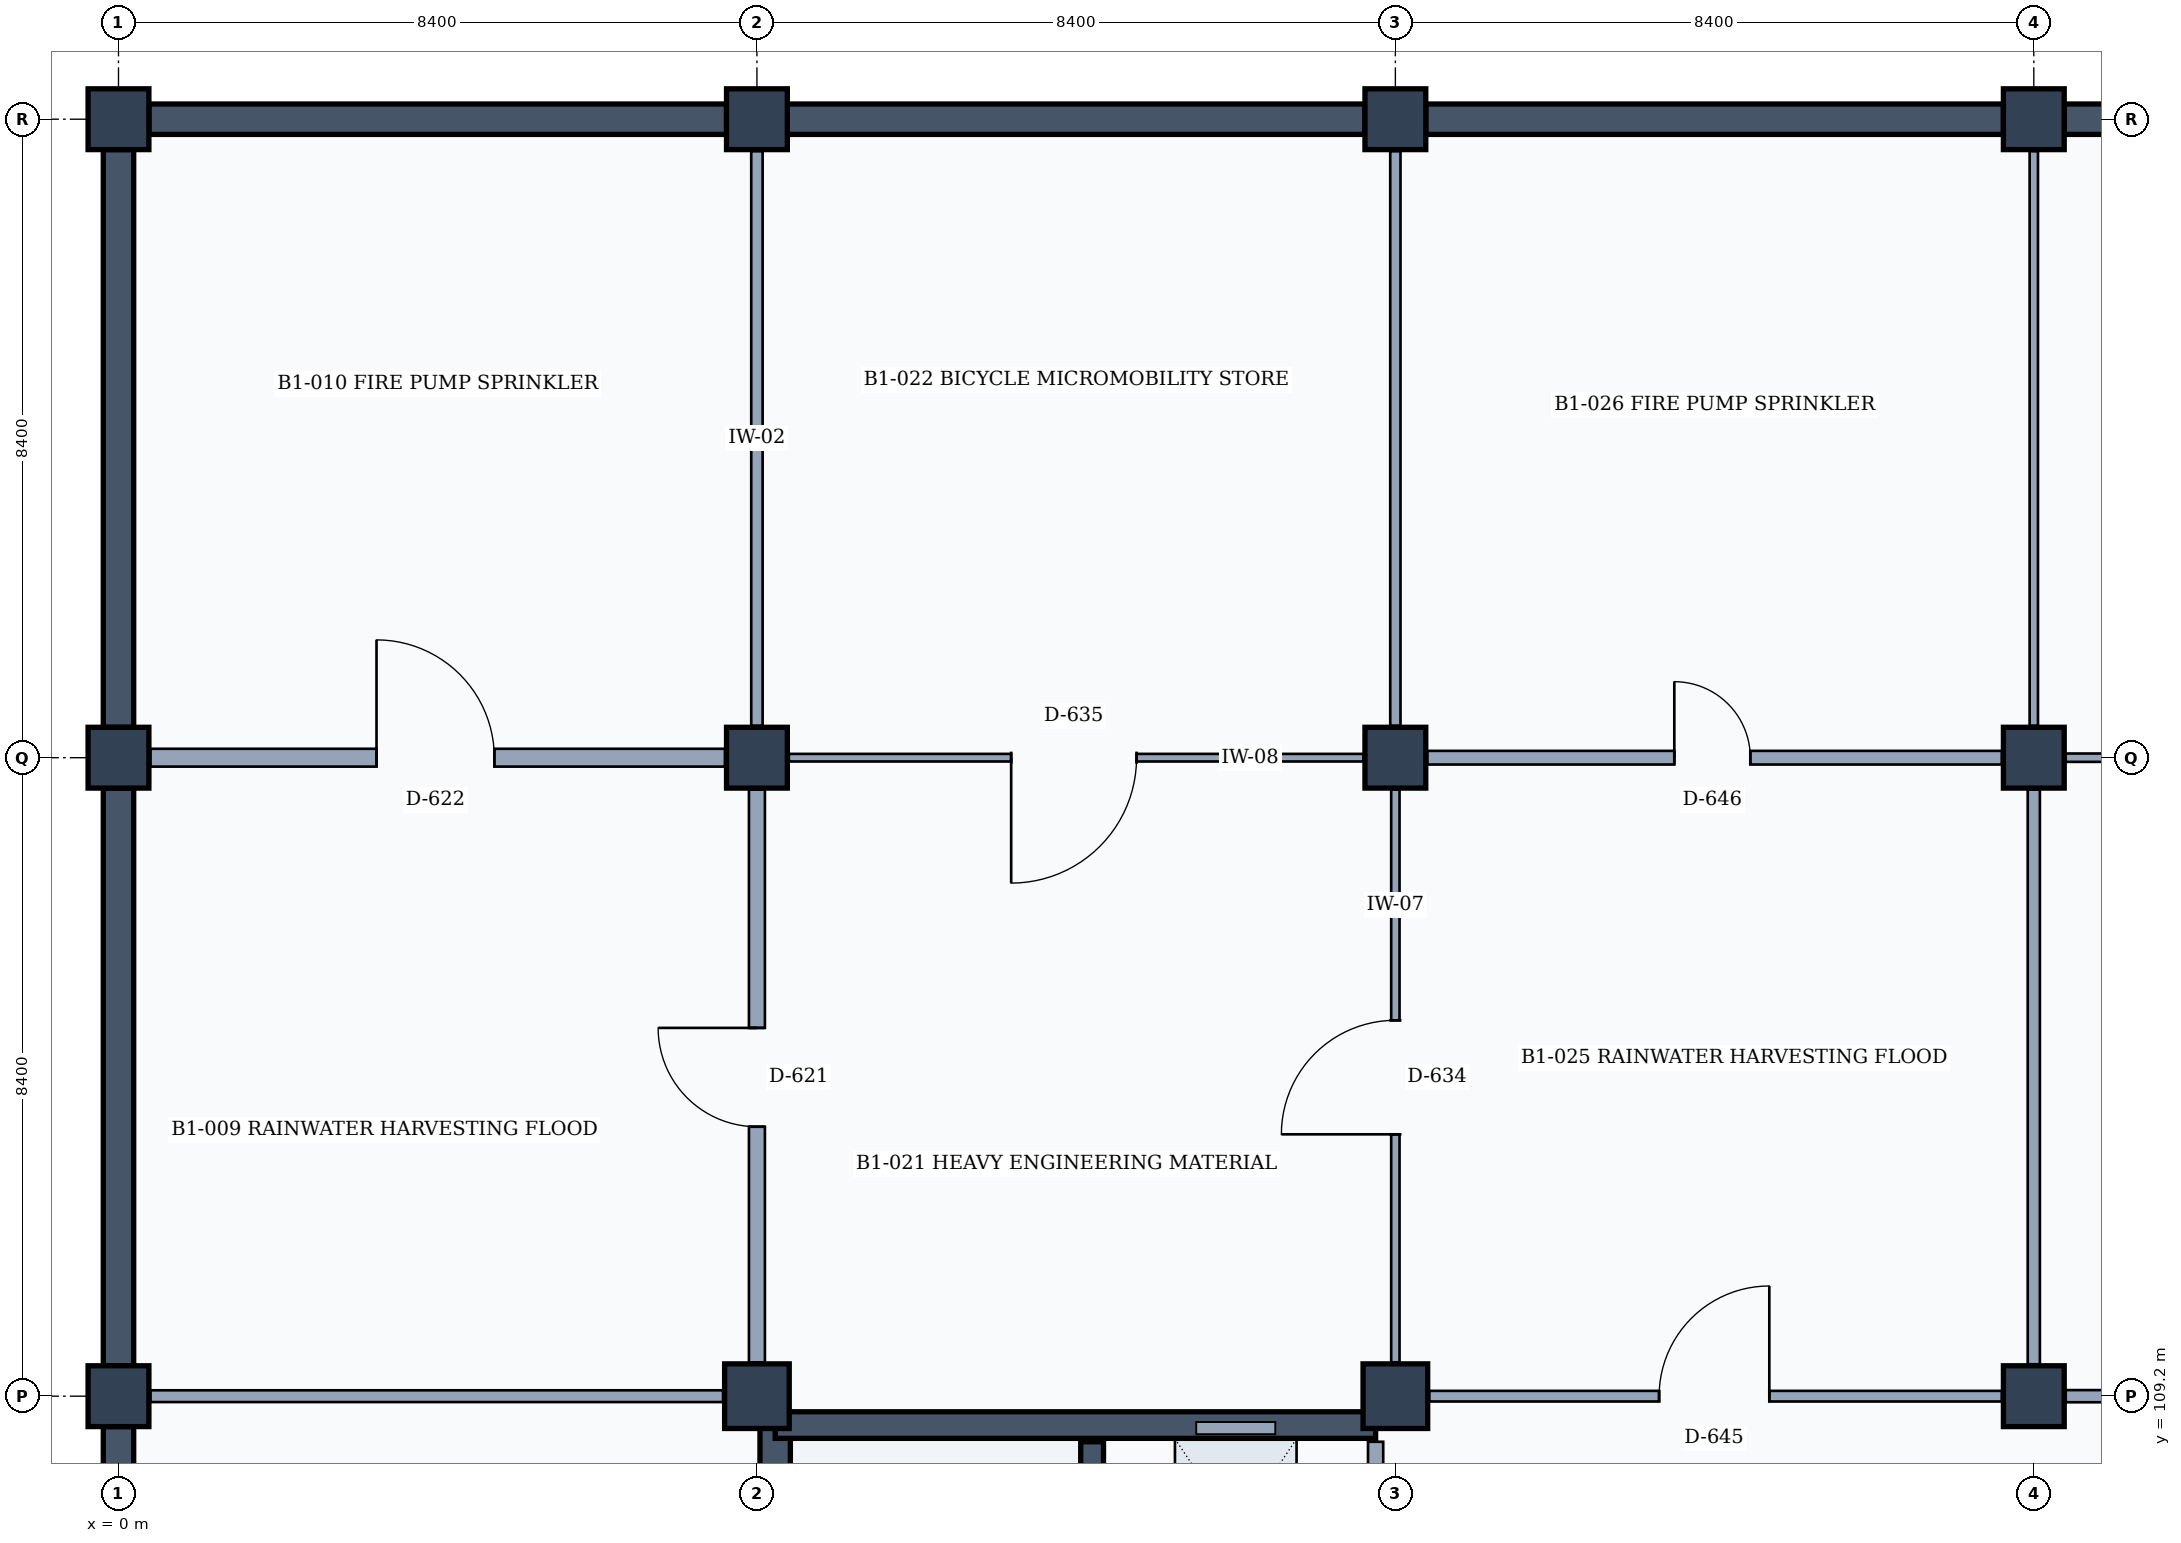
"""IFC4 building model, lengths in metres.
Left out: names, types, materials, properties, quantities, classifications, styles, units other than length and angle.
Written with IfcOpenShell. Run it as: python <this file> out.ifc"""

import sys

from ifc_helpers import new_model, si_unit, direction, frame, frame_2d, origin, origin_2d, place, context, subcontext, project, spatial, rectangle, extrude, element, fill, save


model = new_model("IFC4")
c1 = context("Model", 3, precision=1e-05, world=origin(), true_north=direction((0.0, 1.0)))
c2 = subcontext(c1, "Body", "Model", "MODEL_VIEW")
j1 = project(units=[si_unit("LENGTHUNIT", "METRE"), si_unit("PLANEANGLEUNIT", "RADIAN")], contexts=[c1])
p1 = place(None, origin())
s1 = spatial("IfcSite", under=j1, at=p1, CompositionType="ELEMENT")
p2 = place(p1, origin())
s2 = spatial("IfcBuilding", under=s1, at=p2, CompositionType="ELEMENT")
p3 = place(p2, frame((0.0, 0.0, -4.2)))
s3 = spatial("IfcBuildingStorey", under=s2, at=p3, CompositionType="ELEMENT", Elevation=-4.2)
for number, where, z_axis, x_axis in (
    (1, (0.0, 109.2, 0.0), (0.0, 0.0, 1.0), (1.0, 0.0, 0.0)),
    (2, (0.0, 117.6, 0.0), (0.0, 0.0, 1.0), (1.0, 0.0, 0.0)),
    (3, (0.0, 126.0, 0.0), (0.0, 0.0, 1.0), (1.0, 0.0, 0.0)),
):
    element("IfcColumn", number, at=place(p3, frame(where, z_axis=z_axis, x_axis=x_axis)), inside=s3, PredefinedType="COLUMN", context=c2, shape_type="SweptSolid", body=[
        extrude(rectangle(XDim=0.8, YDim=0.8, at=origin_2d()), origin(), (0.0, 0.0, 1.0), 4.2),
    ])
p4 = place(p3, frame((8.4, 109.2, 0.0), z_axis=(0.0, 0.0, 1.0), x_axis=(1.0, 0.0, 0.0)))
e4 = element("IfcColumn", 4, at=p4, inside=s3, PredefinedType="COLUMN", context=c2, shape_type="SweptSolid", body=[
    extrude(rectangle(XDim=0.85, YDim=0.85, at=origin_2d()), origin(), (0.0, 0.0, 1.0), 4.2),
])
for number, where, z_axis, x_axis in (
    (5, (8.4, 117.6, 0.0), (0.0, 0.0, 1.0), (1.0, 0.0, 0.0)),
    (6, (8.4, 126.0, 0.0), (0.0, 0.0, 1.0), (1.0, 0.0, 0.0)),
):
    element("IfcColumn", number, at=place(p3, frame(where, z_axis=z_axis, x_axis=x_axis)), inside=s3, PredefinedType="COLUMN", context=c2, shape_type="SweptSolid", body=[
        extrude(rectangle(XDim=0.8, YDim=0.8, at=origin_2d()), origin(), (0.0, 0.0, 1.0), 4.2),
    ])
p5 = place(p3, frame((16.8, 109.2, 0.0), z_axis=(0.0, 0.0, 1.0), x_axis=(1.0, 0.0, 0.0)))
e7 = element("IfcColumn", 7, at=p5, inside=s3, PredefinedType="COLUMN", context=c2, shape_type="SweptSolid", body=[
    extrude(rectangle(XDim=0.85, YDim=0.85, at=origin_2d()), origin(), (0.0, 0.0, 1.0), 4.2),
])
for number, where, z_axis, x_axis in (
    (8, (16.8, 117.6, 0.0), (0.0, 0.0, 1.0), (1.0, 0.0, 0.0)),
    (9, (16.8, 126.0, 0.0), (0.0, 0.0, 1.0), (1.0, 0.0, 0.0)),
    (10, (25.2, 109.2, 0.0), (0.0, 0.0, 1.0), (1.0, 0.0, 0.0)),
    (11, (25.2, 117.6, 0.0), (0.0, 0.0, 1.0), (1.0, 0.0, 0.0)),
    (12, (25.2, 126.0, 0.0), (0.0, 0.0, 1.0), (1.0, 0.0, 0.0)),
):
    element("IfcColumn", number, at=place(p3, frame(where, z_axis=z_axis, x_axis=x_axis)), inside=s3, PredefinedType="COLUMN", context=c2, shape_type="SweptSolid", body=[
        extrude(rectangle(XDim=0.8, YDim=0.8, at=origin_2d()), origin(), (0.0, 0.0, 1.0), 4.2),
    ])
p6 = place(p3, frame((0.0, 101.2, 0.0), z_axis=(0.0, 0.0, 1.0), x_axis=(0.0, 1.0, 0.0)))
e13 = element("IfcWall", 13, at=p6, inside=s3, PredefinedType="STANDARD", context=c2, shape_type="SweptSolid", body=[
    extrude(rectangle(XDim=7.6, YDim=0.4, at=frame_2d((3.8, 0.0))), origin(), (0.0, 0.0, 1.0), 3.88),
])
p7 = place(p3, frame((0.0, 109.6, 0.0), z_axis=(0.0, 0.0, 1.0), x_axis=(0.0, 1.0, 0.0)))
e14 = element("IfcWall", 14, at=p7, inside=s3, PredefinedType="STANDARD", context=c2, shape_type="SweptSolid", body=[
    extrude(rectangle(XDim=7.6, YDim=0.4, at=frame_2d((3.8, 0.0))), origin(), (0.0, 0.0, 1.0), 3.88),
])
for number, where, z_axis, x_axis in (
    (15, (0.4, 126.0, 0.0), (0.0, 0.0, 1.0), (1.0, 0.0, 0.0)),
    (16, (0.0, 118.0, 0.0), (0.0, 0.0, 1.0), (0.0, 1.0, 0.0)),
):
    element("IfcWall", number, at=place(p3, frame(where, z_axis=z_axis, x_axis=x_axis)), inside=s3, PredefinedType="STANDARD", context=c2, shape_type="SweptSolid", body=[
        extrude(rectangle(XDim=7.6, YDim=0.4, at=frame_2d((3.8, 0.0))), origin(), (0.0, 0.0, 1.0), 3.88),
    ])
p8 = place(p3, frame((8.8, 126.0, 0.0), z_axis=(0.0, 0.0, 1.0), x_axis=(1.0, 0.0, 0.0)))
e17 = element("IfcWall", 17, at=p8, inside=s3, PredefinedType="STANDARD", context=c2, shape_type="SweptSolid", body=[
    extrude(rectangle(XDim=7.6, YDim=0.4, at=frame_2d((3.8, 0.0))), origin(), (0.0, 0.0, 1.0), 3.88),
])
p9 = place(p3, frame((17.2, 126.0, 0.0), z_axis=(0.0, 0.0, 1.0), x_axis=(1.0, 0.0, 0.0)))
e18 = element("IfcWall", 18, at=p9, inside=s3, PredefinedType="STANDARD", context=c2, shape_type="SweptSolid", body=[
    extrude(rectangle(XDim=7.6, YDim=0.4, at=frame_2d((3.8, 0.0))), origin(), (0.0, 0.0, 1.0), 3.88),
])
p10 = place(p3, frame((25.6, 126.0, 0.0), z_axis=(0.0, 0.0, 1.0), x_axis=(1.0, 0.0, 0.0)))
e19 = element("IfcWall", 19, at=p10, inside=s3, PredefinedType="STANDARD", context=c2, shape_type="SweptSolid", body=[
    extrude(rectangle(XDim=7.625, YDim=0.4, at=frame_2d((3.812, 0.0))), origin(), (0.0, 0.0, 1.0), 3.88),
])
p11 = place(p3, frame((8.64, 101.05, 0.0), z_axis=(0.0, 0.0, 1.0), x_axis=(0.0, 1.0, 0.0)))
e20 = element("IfcWall", 20, at=p11, inside=s3, PredefinedType="SHEAR", context=c2, shape_type="SweptSolid", body=[
    extrude(rectangle(XDim=7.94, YDim=0.4, at=frame_2d((3.97, 0.0))), origin(), (0.0, 0.0, 1.0), 3.9),
])
p12 = place(p3, frame((8.64, 108.82, 0.0), z_axis=(0.0, 0.0, 1.0), x_axis=(1.0, 0.0, 0.0)))
e21 = element("IfcWall", 21, at=p12, inside=s3, PredefinedType="SHEAR", context=c2, shape_type="SweptSolid", body=[
    extrude(rectangle(XDim=7.9, YDim=0.35, at=frame_2d((3.95, 0.0))), origin(), (0.0, 0.0, 1.0), 3.9),
])
p13 = place(p3, frame((16.54, 108.6, 0.0), z_axis=(0.0, 0.0, 1.0), x_axis=(0.0, -1.0, 0.0)))
e22 = element("IfcWall", 22, at=p13, inside=s3, PredefinedType="PARTITIONING", context=c2, shape_type="SweptSolid", body=[
    extrude(rectangle(XDim=7.2, YDim=0.2, at=frame_2d((3.6, 0.0))), origin(), (0.0, 0.0, 1.0), 3.25),
])
p14 = place(p13, frame((3.55, 0.0, 0.0)))
e23 = element("IfcOpeningElement", 23, at=p14, cuts=e22, PredefinedType="OPENING", context=c2, shape_type="SweptSolid", body=[
    extrude(rectangle(XDim=1.1, YDim=2.15, at=frame_2d((0.55, 1.075))), frame((0.0, 0.11, 0.0), z_axis=(0.0, -1.0, 0.0), x_axis=(1.0, 0.0, 0.0)), (0.0, 0.0, 1.0), 0.22),
])
p15 = place(p3, frame((12.81, 101.22, 0.0), z_axis=(0.0, 0.0, 1.0), x_axis=(0.0, 1.0, 0.0)))
e24 = element("IfcWall", 24, at=p15, inside=s3, PredefinedType="SHEAR", context=c2, shape_type="SweptSolid", body=[
    extrude(rectangle(XDim=7.38, YDim=0.3, at=frame_2d((3.69, 0.0))), origin(), (0.0, 0.0, 1.0), 3.9),
])
p16 = place(p15, frame((0.28, 0.0, 0.0)))
e25 = element("IfcOpeningElement", 25, at=p16, cuts=e24, PredefinedType="OPENING", context=c2, shape_type="SweptSolid", body=[
    extrude(rectangle(XDim=1.1, YDim=2.15, at=frame_2d((0.55, 1.075))), frame((0.0, 0.16, 0.0), z_axis=(0.0, -1.0, 0.0), x_axis=(1.0, 0.0, 0.0)), (0.0, 0.0, 1.0), 0.32),
])
p17 = place(p3, frame((0.42, 109.2, 0.0), z_axis=(0.0, 0.0, 1.0), x_axis=(1.0, 0.0, 0.0)))
e26 = element("IfcWall", 26, at=p17, inside=s3, PredefinedType="PARTITIONING", context=c2, shape_type="SweptSolid", body=[
    extrude(rectangle(XDim=7.535, YDim=0.155, at=frame_2d((3.768, 0.0))), origin(), (0.0, 0.0, 1.0), 3.05),
])
p18 = place(p3, frame((8.4, 109.645, 0.0), z_axis=(0.0, 0.0, 1.0), x_axis=(0.0, 1.0, 0.0)))
e27 = element("IfcWall", 27, at=p18, inside=s3, PredefinedType="PARTITIONING", context=c2, shape_type="SweptSolid", body=[
    extrude(rectangle(XDim=7.535, YDim=0.21, at=frame_2d((3.768, 0.0))), origin(), (0.0, 0.0, 1.0), 3.25),
])
p19 = place(p18, frame((3.1, 0.0, 0.0)))
e28 = element("IfcOpeningElement", 28, at=p19, cuts=e27, PredefinedType="OPENING", context=c2, shape_type="SweptSolid", body=[
    extrude(rectangle(XDim=1.3, YDim=2.2, at=frame_2d((0.65, 1.1))), frame((0.0, 0.115, 0.0), z_axis=(0.0, -1.0, 0.0), x_axis=(1.0, 0.0, 0.0)), (0.0, 0.0, 1.0), 0.23),
])
p20 = place(p3, frame((0.42, 117.6, 0.0), z_axis=(0.0, 0.0, 1.0), x_axis=(1.0, 0.0, 0.0)))
e29 = element("IfcWall", 29, at=p20, inside=s3, PredefinedType="PARTITIONING", context=c2, shape_type="SweptSolid", body=[
    extrude(rectangle(XDim=7.56, YDim=0.235, at=frame_2d((3.78, 0.0))), origin(), (0.0, 0.0, 1.0), 3.05),
])
p21 = place(p20, frame((2.975, 0.0, 0.0)))
e30 = element("IfcOpeningElement", 30, at=p21, cuts=e29, PredefinedType="OPENING", context=c2, shape_type="SweptSolid", body=[
    extrude(rectangle(XDim=1.55, YDim=2.35, at=frame_2d((0.775, 1.175))), frame((0.0, 0.127, 0.0), z_axis=(0.0, -1.0, 0.0), x_axis=(1.0, 0.0, 0.0)), (0.0, 0.0, 1.0), 0.255),
])
p22 = place(p3, frame((8.4, 118.02, 0.0), z_axis=(0.0, 0.0, 1.0), x_axis=(0.0, 1.0, 0.0)))
e31 = element("IfcWall", 31, at=p22, inside=s3, PredefinedType="PARTITIONING", context=c2, shape_type="SweptSolid", body=[
    extrude(rectangle(XDim=7.56, YDim=0.15, at=frame_2d((3.78, 0.0))), origin(), (0.0, 0.0, 1.0), 3.25),
])
p23 = place(p3, frame((16.8, 109.645, 0.0), z_axis=(0.0, 0.0, 1.0), x_axis=(0.0, 1.0, 0.0)))
e32 = element("IfcWall", 32, at=p23, inside=s3, PredefinedType="PARTITIONING", context=c2, shape_type="SweptSolid", body=[
    extrude(rectangle(XDim=7.535, YDim=0.11, at=frame_2d((3.768, 0.0))), origin(), (0.0, 0.0, 1.0), 3.25),
])
p24 = place(p23, frame((3.0, 0.0, 0.0)))
e33 = element("IfcOpeningElement", 33, at=p24, cuts=e32, PredefinedType="OPENING", context=c2, shape_type="SweptSolid", body=[
    extrude(rectangle(XDim=1.5, YDim=2.3, at=frame_2d((0.75, 1.15))), frame((0.0, 0.065, 0.0), z_axis=(0.0, -1.0, 0.0), x_axis=(1.0, 0.0, 0.0)), (0.0, 0.0, 1.0), 0.13),
])
p25 = place(p3, frame((8.82, 117.6, 0.0), z_axis=(0.0, 0.0, 1.0), x_axis=(1.0, 0.0, 0.0)))
e34 = element("IfcWall", 34, at=p25, inside=s3, PredefinedType="MOVABLE", context=c2, shape_type="SweptSolid", body=[
    extrude(rectangle(XDim=7.56, YDim=0.1, at=frame_2d((3.78, 0.0))), origin(), (0.0, 0.0, 1.0), 3.05),
])
p26 = place(p25, frame((2.925, 0.0, 0.0)))
e35 = element("IfcOpeningElement", 35, at=p26, cuts=e34, PredefinedType="OPENING", context=c2, shape_type="SweptSolid", body=[
    extrude(rectangle(XDim=1.65, YDim=2.25, at=frame_2d((0.825, 1.125))), frame((0.0, 0.06, 0.0), z_axis=(0.0, -1.0, 0.0), x_axis=(1.0, 0.0, 0.0)), (0.0, 0.0, 1.0), 0.12),
])
p27 = place(p3, frame((16.8, 118.02, 0.0), z_axis=(0.0, 0.0, 1.0), x_axis=(0.0, 1.0, 0.0)))
e36 = element("IfcWall", 36, at=p27, inside=s3, PredefinedType="PARTITIONING", context=c2, shape_type="SweptSolid", body=[
    extrude(rectangle(XDim=7.56, YDim=0.135, at=frame_2d((3.78, 0.0))), origin(), (0.0, 0.0, 1.0), 3.25),
])
p28 = place(p3, frame((17.245, 109.2, 0.0), z_axis=(0.0, 0.0, 1.0), x_axis=(1.0, 0.0, 0.0)))
e37 = element("IfcWall", 37, at=p28, inside=s3, PredefinedType="PARTITIONING", context=c2, shape_type="SweptSolid", body=[
    extrude(rectangle(XDim=7.535, YDim=0.14, at=frame_2d((3.768, 0.0))), origin(), (0.0, 0.0, 1.0), 3.05),
])
p29 = place(p28, frame((3.025, 0.0, 0.0)))
e38 = element("IfcOpeningElement", 38, at=p29, cuts=e37, PredefinedType="OPENING", context=c2, shape_type="SweptSolid", body=[
    extrude(rectangle(XDim=1.45, YDim=2.35, at=frame_2d((0.725, 1.175))), frame((0.0, 0.08, 0.0), z_axis=(0.0, -1.0, 0.0), x_axis=(1.0, 0.0, 0.0)), (0.0, 0.0, 1.0), 0.16),
])
p30 = place(p3, frame((25.2, 109.62, 0.0), z_axis=(0.0, 0.0, 1.0), x_axis=(0.0, 1.0, 0.0)))
e39 = element("IfcWall", 39, at=p30, inside=s3, PredefinedType="PARTITIONING", context=c2, shape_type="SweptSolid", body=[
    extrude(rectangle(XDim=7.56, YDim=0.16, at=frame_2d((3.78, 0.0))), origin(), (0.0, 0.0, 1.0), 3.25),
])
p31 = place(p3, frame((17.22, 117.6, 0.0), z_axis=(0.0, 0.0, 1.0), x_axis=(1.0, 0.0, 0.0)))
e40 = element("IfcWall", 40, at=p31, inside=s3, PredefinedType="PARTITIONING", context=c2, shape_type="SweptSolid", body=[
    extrude(rectangle(XDim=7.56, YDim=0.18, at=frame_2d((3.78, 0.0))), origin(), (0.0, 0.0, 1.0), 3.05),
])
p32 = place(p31, frame((3.25, 0.0, 0.0)))
e41 = element("IfcOpeningElement", 41, at=p32, cuts=e40, PredefinedType="OPENING", context=c2, shape_type="SweptSolid", body=[
    extrude(rectangle(XDim=1.0, YDim=2.15, at=frame_2d((0.5, 1.075))), frame((0.0, 0.1, 0.0), z_axis=(0.0, -1.0, 0.0), x_axis=(1.0, 0.0, 0.0)), (0.0, 0.0, 1.0), 0.2),
])
p33 = place(p3, frame((25.2, 118.02, 0.0), z_axis=(0.0, 0.0, 1.0), x_axis=(0.0, 1.0, 0.0)))
e42 = element("IfcWall", 42, at=p33, inside=s3, PredefinedType="PARTITIONING", context=c2, shape_type="SweptSolid", body=[
    extrude(rectangle(XDim=7.56, YDim=0.11, at=frame_2d((3.78, 0.0))), origin(), (0.0, 0.0, 1.0), 3.25),
])
p34 = place(p3, frame((25.62, 109.2, 0.0), z_axis=(0.0, 0.0, 1.0), x_axis=(1.0, 0.0, 0.0)))
e43 = element("IfcWall", 43, at=p34, inside=s3, PredefinedType="PARTITIONING", context=c2, shape_type="SweptSolid", body=[
    extrude(rectangle(XDim=7.585, YDim=0.16, at=frame_2d((3.792, 0.0))), origin(), (0.0, 0.0, 1.0), 3.05),
])
p35 = place(p34, frame((2.925, 0.0, 0.0)))
e44 = element("IfcOpeningElement", 44, at=p35, cuts=e43, PredefinedType="OPENING", context=c2, shape_type="SweptSolid", body=[
    extrude(rectangle(XDim=1.65, YDim=2.25, at=frame_2d((0.825, 1.125))), frame((0.0, 0.09, 0.0), z_axis=(0.0, -1.0, 0.0), x_axis=(1.0, 0.0, 0.0)), (0.0, 0.0, 1.0), 0.18),
])
p36 = place(p3, frame((25.62, 117.6, 0.0), z_axis=(0.0, 0.0, 1.0), x_axis=(1.0, 0.0, 0.0)))
e45 = element("IfcWall", 45, at=p36, inside=s3, PredefinedType="PARTITIONING", context=c2, shape_type="SweptSolid", body=[
    extrude(rectangle(XDim=7.585, YDim=0.11, at=frame_2d((3.792, 0.0))), origin(), (0.0, 0.0, 1.0), 3.05),
])
p37 = place(p36, frame((3.225, 0.0, 0.0)))
e46 = element("IfcOpeningElement", 46, at=p37, cuts=e45, PredefinedType="OPENING", context=c2, shape_type="SweptSolid", body=[
    extrude(rectangle(XDim=1.05, YDim=2.2, at=frame_2d((0.525, 1.1))), frame((0.0, 0.065, 0.0), z_axis=(0.0, -1.0, 0.0), x_axis=(1.0, 0.0, 0.0)), (0.0, 0.0, 1.0), 0.13),
])
p38 = place(p19, origin())
e47 = element("IfcDoor", 47, at=p38, inside=s3, OperationType="SINGLE_SWING_RIGHT", PredefinedType="DOOR", context=c2, shape_type="SweptSolid", body=[
    extrude(rectangle(XDim=1.3, YDim=2.2, at=frame_2d((0.65, 1.1))), frame((0.0, 0.025, 0.0), z_axis=(0.0, -1.0, 0.0), x_axis=(1.0, 0.0, 0.0)), (0.0, 0.0, 1.0), 0.05),
])
fill(e28, e47)
p39 = place(p21, origin())
e48 = element("IfcDoor", 48, at=p39, inside=s3, OperationType="SINGLE_SWING_LEFT", PredefinedType="DOOR", context=c2, shape_type="SweptSolid", body=[
    extrude(rectangle(XDim=1.55, YDim=2.35, at=frame_2d((0.775, 1.175))), frame((0.0, 0.025, 0.0), z_axis=(0.0, -1.0, 0.0), x_axis=(1.0, 0.0, 0.0)), (0.0, 0.0, 1.0), 0.05),
])
fill(e30, e48)
p40 = place(p24, origin())
e49 = element("IfcDoor", 49, at=p40, inside=s3, OperationType="SINGLE_SWING_LEFT", PredefinedType="DOOR", context=c2, shape_type="SweptSolid", body=[
    extrude(rectangle(XDim=1.5, YDim=2.3, at=frame_2d((0.75, 1.15))), frame((0.0, 0.025, 0.0), z_axis=(0.0, -1.0, 0.0), x_axis=(1.0, 0.0, 0.0)), (0.0, 0.0, 1.0), 0.05),
])
fill(e33, e49)
p41 = place(p26, frame((1.65, 0.0, 0.0), z_axis=(0.0, 0.0, 1.0), x_axis=(-1.0, 0.0, 0.0)))
e50 = element("IfcDoor", 50, at=p41, inside=s3, OperationType="SINGLE_SWING_RIGHT", PredefinedType="DOOR", context=c2, shape_type="SweptSolid", body=[
    extrude(rectangle(XDim=1.65, YDim=2.25, at=frame_2d((0.825, 1.125))), frame((0.0, 0.025, 0.0), z_axis=(0.0, -1.0, 0.0), x_axis=(1.0, 0.0, 0.0)), (0.0, 0.0, 1.0), 0.05),
])
fill(e35, e50)
p42 = place(p29, origin())
e51 = element("IfcDoor", 51, at=p42, inside=s3, OperationType="SINGLE_SWING_RIGHT", PredefinedType="DOOR", context=c2, shape_type="SweptSolid", body=[
    extrude(rectangle(XDim=1.45, YDim=2.35, at=frame_2d((0.725, 1.175))), frame((0.0, 0.025, 0.0), z_axis=(0.0, -1.0, 0.0), x_axis=(1.0, 0.0, 0.0)), (0.0, 0.0, 1.0), 0.05),
])
fill(e38, e51)
p43 = place(p32, origin())
e52 = element("IfcDoor", 52, at=p43, inside=s3, OperationType="SINGLE_SWING_LEFT", PredefinedType="DOOR", context=c2, shape_type="SweptSolid", body=[
    extrude(rectangle(XDim=1.0, YDim=2.15, at=frame_2d((0.5, 1.075))), frame((0.0, 0.025, 0.0), z_axis=(0.0, -1.0, 0.0), x_axis=(1.0, 0.0, 0.0)), (0.0, 0.0, 1.0), 0.05),
])
fill(e41, e52)
save(model, sys.argv[1])
